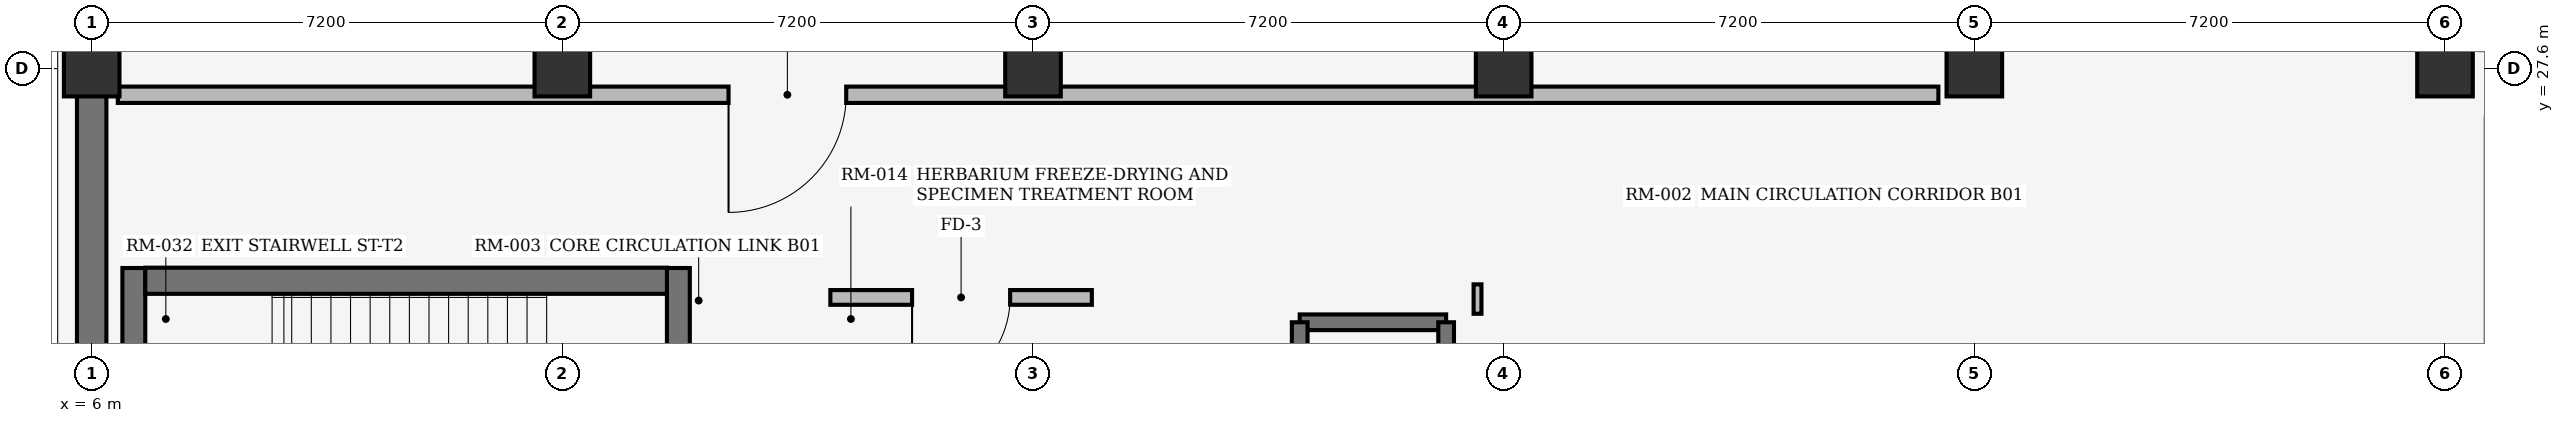
"""IFC4 building model, lengths in metres.
Left out: names, types, materials, properties, quantities, classifications, styles, units other than length and angle.
Written with IfcOpenShell. Run it as: python <this file> out.ifc"""

import sys

from ifc_helpers import new_model, si_unit, direction, frame, frame_2d, origin, origin_2d, place, context, subcontext, project, spatial, rectangle, extrude, element, fill, save


model = new_model("IFC4")
c1 = context("Model", 3, precision=1e-05, world=origin(), true_north=direction((0.0, 1.0)))
c2 = subcontext(c1, "Body", "Model", "MODEL_VIEW")
j1 = project(units=[si_unit("LENGTHUNIT", "METRE"), si_unit("PLANEANGLEUNIT", "RADIAN")], contexts=[c1])
p1 = place(None, origin())
s1 = spatial("IfcSite", under=j1, at=p1, CompositionType="ELEMENT")
p2 = place(p1, origin())
s2 = spatial("IfcBuilding", under=s1, at=p2, CompositionType="ELEMENT")
p3 = place(p2, frame((0.0, 0.0, -4.8)))
s3 = spatial("IfcBuildingStorey", under=s2, at=p3, CompositionType="ELEMENT", Elevation=-4.8)
for number, where, z_axis, x_axis in (
    (1, (6.0, 27.6, 0.0), (0.0, 0.0, 1.0), (1.0, 0.0, 0.0)),
    (2, (13.2, 27.6, 0.0), (0.0, 0.0, 1.0), (1.0, 0.0, 0.0)),
    (3, (20.4, 27.6, 0.0), (0.0, 0.0, 1.0), (1.0, 0.0, 0.0)),
    (4, (27.6, 27.6, 0.0), (0.0, 0.0, 1.0), (1.0, 0.0, 0.0)),
    (5, (34.8, 27.6, 0.0), (0.0, 0.0, 1.0), (1.0, 0.0, 0.0)),
    (6, (42.0, 27.6, 0.0), (0.0, 0.0, 1.0), (1.0, 0.0, 0.0)),
):
    element("IfcColumn", number, at=place(p3, frame(where, z_axis=z_axis, x_axis=x_axis)), inside=s3, PredefinedType="COLUMN", context=c2, shape_type="SweptSolid", body=[
        extrude(rectangle(XDim=0.85, YDim=0.85, at=origin_2d()), origin(), (0.0, 0.0, 1.0), 4.5),
    ])
p4 = place(p3, frame((6.0, 34.8, 0.0), z_axis=(0.0, 0.0, 1.0), x_axis=(0.0, -1.0, 0.0)))
e7 = element("IfcWall", 7, at=p4, inside=s3, PredefinedType="USERDEFINED", context=c2, shape_type="SweptSolid", body=[
    extrude(rectangle(XDim=28.8, YDim=0.45, at=frame_2d((14.4, 0.0))), origin(), (0.0, 0.0, 1.0), 4.5),
])
p5 = place(p3, frame((14.975, 24.55, 0.0), z_axis=(0.0, 0.0, 1.0), x_axis=(0.0, -1.0, 0.0)))
e8 = element("IfcWall", 8, at=p5, inside=s3, PredefinedType="SHEAR", context=c2, shape_type="SweptSolid", body=[
    extrude(rectangle(XDim=4.59, YDim=0.35, at=frame_2d((2.295, 0.0))), origin(), (0.0, 0.0, 1.0), 4.5),
])
p6 = place(p5, frame((1.72, 0.0, 0.0)))
e9 = element("IfcOpeningElement", 9, at=p6, cuts=e8, PredefinedType="OPENING", context=c2, shape_type="SweptSolid", body=[
    extrude(rectangle(XDim=1.15, YDim=2.2, at=frame_2d((0.575, 1.1))), frame((0.0, 0.185, 0.0), z_axis=(0.0, -1.0, 0.0), x_axis=(1.0, 0.0, 0.0)), (0.0, 0.0, 1.0), 0.37),
])
p7 = place(p3, frame((6.645, 24.55, 0.0), z_axis=(0.0, 0.0, 1.0), x_axis=(0.0, -1.0, 0.0)))
e10 = element("IfcWall", 10, at=p7, inside=s3, PredefinedType="SHEAR", context=c2, shape_type="SweptSolid", body=[
    extrude(rectangle(XDim=4.59, YDim=0.35, at=frame_2d((2.295, 0.0))), origin(), (0.0, 0.0, 1.0), 4.5),
])
p8 = place(p3, frame((14.8, 24.355, 0.0), z_axis=(0.0, 0.0, 1.0), x_axis=(-1.0, 0.0, 0.0)))
e11 = element("IfcWall", 11, at=p8, inside=s3, PredefinedType="SHEAR", context=c2, shape_type="SweptSolid", body=[
    extrude(rectangle(XDim=7.98, YDim=0.4, at=frame_2d((3.99, 0.0))), origin(), (0.0, 0.0, 1.0), 4.5),
])
p9 = place(p3, frame((24.48, 23.72, 0.0), z_axis=(0.0, 0.0, 1.0), x_axis=(1.0, 0.0, 0.0)))
e12 = element("IfcWall", 12, at=p9, inside=s3, PredefinedType="SHEAR", context=c2, shape_type="SweptSolid", body=[
    extrude(rectangle(XDim=2.24, YDim=0.24, at=frame_2d((1.12, 0.0))), origin(), (0.0, 0.0, 1.0), 4.5),
])
for number, where, z_axis, x_axis in (
    (13, (24.48, 20.78, 0.0), (0.0, 0.0, 1.0), (0.0, 1.0, 0.0)),
    (14, (26.72, 20.78, 0.0), (0.0, 0.0, 1.0), (0.0, 1.0, 0.0)),
):
    element("IfcWall", number, at=place(p3, frame(where, z_axis=z_axis, x_axis=x_axis)), inside=s3, PredefinedType="SHEAR", context=c2, shape_type="SweptSolid", body=[
        extrude(rectangle(XDim=2.94, YDim=0.24, at=frame_2d((1.47, 0.0))), origin(), (0.0, 0.0, 1.0), 4.5),
    ])
p10 = place(p3, frame((27.2, 24.3, 0.0), z_axis=(0.0, 0.0, 1.0), x_axis=(0.0, -1.0, 0.0)))
e15 = element("IfcWall", 15, at=p10, inside=s3, PredefinedType="PARTITIONING", context=c2, shape_type="SweptSolid", body=[
    extrude(rectangle(XDim=0.45, YDim=0.12, at=frame_2d((0.225, 0.0))), origin(), (0.0, 0.0, 1.0), 4.48),
])
p11 = place(p3, frame((6.4, 27.2, 0.0), z_axis=(0.0, 0.0, 1.0), x_axis=(1.0, 0.0, 0.0)))
e16 = element("IfcWall", 16, at=p11, inside=s3, PredefinedType="SOLIDWALL", context=c2, shape_type="SweptSolid", body=[
    extrude(rectangle(XDim=27.85, YDim=0.25, at=frame_2d((13.925, 0.0))), origin(), (0.0, 0.0, 1.0), 4.48),
])
p12 = place(p11, frame((9.343, 0.0, 0.0)))
e17 = element("IfcOpeningElement", 17, at=p12, cuts=e16, PredefinedType="OPENING", context=c2, shape_type="SweptSolid", body=[
    extrude(rectangle(XDim=1.8, YDim=2.25, at=frame_2d((0.9, 1.125))), frame((0.0, 0.135, 0.0), z_axis=(0.0, -1.0, 0.0), x_axis=(1.0, 0.0, 0.0)), (0.0, 0.0, 1.0), 0.27),
])
p13 = place(p3, frame((17.3, 24.1, 0.0), z_axis=(0.0, 0.0, 1.0), x_axis=(1.0, 0.0, 0.0)))
e18 = element("IfcWall", 18, at=p13, inside=s3, PredefinedType="SOLIDWALL", context=c2, shape_type="SweptSolid", body=[
    extrude(rectangle(XDim=4.0, YDim=0.225, at=frame_2d((2.0, 0.0))), origin(), (0.0, 0.0, 1.0), 4.48),
])
p14 = place(p13, frame((1.25, 0.0, 0.0)))
e19 = element("IfcOpeningElement", 19, at=p14, cuts=e18, PredefinedType="OPENING", context=c2, shape_type="SweptSolid", body=[
    extrude(rectangle(XDim=1.5, YDim=2.2, at=frame_2d((0.75, 1.1))), frame((0.0, 0.123, 0.0), z_axis=(0.0, -1.0, 0.0), x_axis=(1.0, 0.0, 0.0)), (0.0, 0.0, 1.0), 0.245),
])
p15 = place(p12, frame((1.8, 0.0, 0.0), z_axis=(0.0, 0.0, 1.0), x_axis=(-1.0, 0.0, 0.0)))
e20 = element("IfcDoor", 20, at=p15, inside=s3, OperationType="DOUBLE_DOOR_SINGLE_SWING", PredefinedType="DOOR", context=c2, shape_type="SweptSolid", body=[
    extrude(rectangle(XDim=1.8, YDim=2.25, at=frame_2d((0.9, 1.125))), frame((0.0, 0.025, 0.0), z_axis=(0.0, -1.0, 0.0), x_axis=(1.0, 0.0, 0.0)), (0.0, 0.0, 1.0), 0.05),
])
fill(e17, e20)
p16 = place(p14, frame((1.5, 0.0, 0.0), z_axis=(0.0, 0.0, 1.0), x_axis=(-1.0, 0.0, 0.0)))
e21 = element("IfcDoor", 21, at=p16, inside=s3, OperationType="SINGLE_SWING_LEFT", PredefinedType="DOOR", context=c2, shape_type="SweptSolid", body=[
    extrude(rectangle(XDim=1.5, YDim=2.2, at=frame_2d((0.75, 1.1))), frame((0.0, 0.025, 0.0), z_axis=(0.0, -1.0, 0.0), x_axis=(1.0, 0.0, 0.0)), (0.0, 0.0, 1.0), 0.05),
])
fill(e19, e21)
save(model, sys.argv[1])
